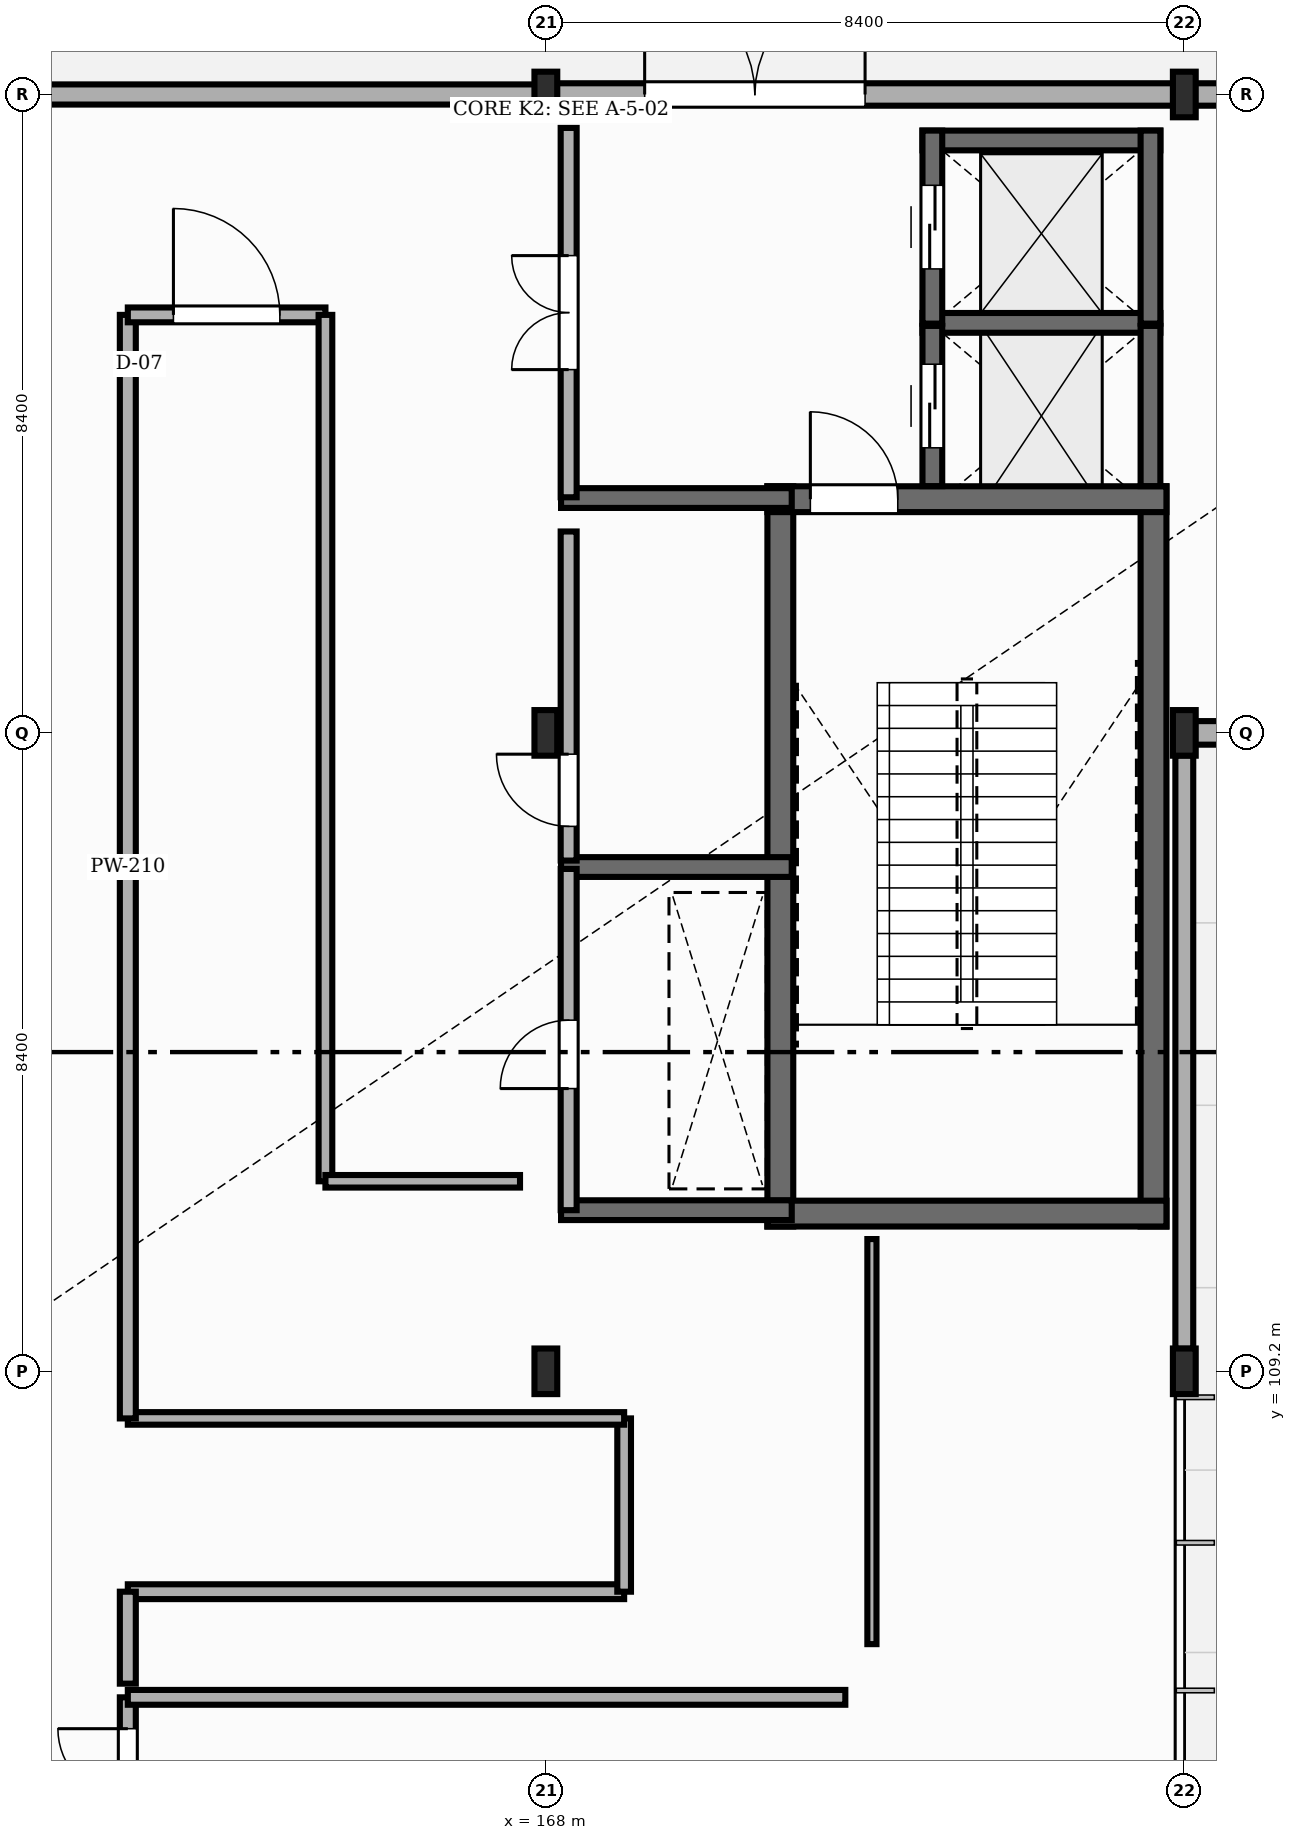
"""IFC4 building model, lengths in metres.
Left out: names, types, materials, properties, quantities, classifications, styles, units other than length and angle.
Written with IfcOpenShell. Run it as: python <this file> out.ifc"""

import sys

from ifc_helpers import new_model, si_unit, direction, frame, frame_2d, origin, origin_2d, place, context, subcontext, project, spatial, rectangle, i_section, extrude, element, fill, save


model = new_model("IFC4")
c1 = context("Model", 3, precision=1e-05, world=origin(), true_north=direction((0.0, 1.0)))
c2 = subcontext(c1, "Body", "Model", "MODEL_VIEW")
j1 = project(units=[si_unit("LENGTHUNIT", "METRE"), si_unit("PLANEANGLEUNIT", "RADIAN")], contexts=[c1])
p1 = place(None, origin())
s1 = spatial("IfcSite", under=j1, at=p1, CompositionType="ELEMENT")
p2 = place(p1, origin())
s2 = spatial("IfcBuilding", under=s1, at=p2, CompositionType="ELEMENT")
p3 = place(p2, origin())
s3 = spatial("IfcBuildingStorey", under=s2, at=p3, CompositionType="ELEMENT", Elevation=0.0)
for number, where, z_axis, x_axis in (
    (1, (168.0, 109.2, 0.0), (0.0, 0.0, 1.0), (1.0, 0.0, 0.0)),
    (2, (168.0, 117.6, 0.0), (0.0, 0.0, 1.0), (1.0, 0.0, 0.0)),
    (3, (168.0, 126.0, 0.0), (0.0, 0.0, 1.0), (1.0, 0.0, 0.0)),
    (4, (176.4, 109.2, 0.0), (0.0, 0.0, 1.0), (1.0, 0.0, 0.0)),
    (5, (176.4, 117.6, 0.0), (0.0, 0.0, 1.0), (1.0, 0.0, 0.0)),
    (6, (176.4, 126.0, 0.0), (0.0, 0.0, 1.0), (1.0, 0.0, 0.0)),
):
    element("IfcColumn", number, at=place(p3, frame(where, z_axis=z_axis, x_axis=x_axis)), inside=s3, PredefinedType="COLUMN", context=c2, shape_type="SweptSolid", body=[
        extrude(i_section(OverallWidth=0.3, OverallDepth=0.6, WebThickness=0.015, FlangeThickness=0.03, FilletRadius=0.027, at=origin_2d()), origin(), (0.0, 0.0, 1.0), 5.4),
    ])
p4 = place(p3, frame((176.4, 109.496, 0.0), z_axis=(0.0, 0.0, 1.0), x_axis=(0.0, 1.0, 0.0)))
e7 = element("IfcWall", 7, at=p4, inside=s3, PredefinedType="STANDARD", context=c2, shape_type="SweptSolid", body=[
    extrude(rectangle(XDim=7.808, YDim=0.235, at=frame_2d((3.904, 0.0))), origin(), (0.0, 0.0, 1.0), 4.797),
])
p5 = place(p3, frame((176.408, 117.6, 0.0), z_axis=(0.0, 0.0, 1.0), x_axis=(1.0, 0.0, 0.0)))
e8 = element("IfcWall", 8, at=p5, inside=s3, PredefinedType="STANDARD", context=c2, shape_type="SweptSolid", body=[
    extrude(rectangle(XDim=8.384, YDim=0.31, at=frame_2d((4.192, 0.0))), origin(), (0.0, 0.0, 1.0), 4.827),
])
p6 = place(p3, frame((184.792, 126.0, 0.0), z_axis=(0.0, 0.0, 1.0), x_axis=(-1.0, 0.0, 0.0)))
e9 = element("IfcWall", 9, at=p6, inside=s3, PredefinedType="STANDARD", context=c2, shape_type="SweptSolid", body=[
    extrude(rectangle(XDim=8.384, YDim=0.295, at=frame_2d((4.192, 0.0))), origin(), (0.0, 0.0, 1.0), 4.797),
])
p7 = place(p3, frame((168.008, 126.0, 0.0), z_axis=(0.0, 0.0, 1.0), x_axis=(1.0, 0.0, 0.0)))
e10 = element("IfcWall", 10, at=p7, inside=s3, PredefinedType="STANDARD", context=c2, shape_type="SweptSolid", body=[
    extrude(rectangle(XDim=8.384, YDim=0.295, at=frame_2d((4.192, 0.0))), origin(), (0.0, 0.0, 1.0), 4.827),
])
p8 = place(p7, frame((1.292, 0.0, 0.0)))
e11 = element("IfcOpeningElement", 11, at=p8, cuts=e10, PredefinedType="OPENING", context=c2, shape_type="SweptSolid", body=[
    extrude(rectangle(XDim=2.9, YDim=2.38, at=frame_2d((1.45, 1.19))), frame((0.0, 0.157, 0.0), z_axis=(0.0, -1.0, 0.0), x_axis=(1.0, 0.0, 0.0)), (0.0, 0.0, 1.0), 0.315),
])
p9 = place(p3, frame((167.992, 126.0, 0.0), z_axis=(0.0, 0.0, 1.0), x_axis=(-1.0, 0.0, 0.0)))
e12 = element("IfcWall", 12, at=p9, inside=s3, PredefinedType="STANDARD", context=c2, shape_type="SweptSolid", body=[
    extrude(rectangle(XDim=8.384, YDim=0.265, at=frame_2d((4.192, 0.0))), origin(), (0.0, 0.0, 1.0), 4.797),
])
for number, where, z_axis, x_axis in (
    (13, (171.085, 111.105, 0.0), (0.0, 0.0, 1.0), (0.0, 1.0, 0.0)),
    (14, (175.995, 111.105, 0.0), (0.0, 0.0, 1.0), (0.0, 1.0, 0.0)),
):
    element("IfcWall", number, at=place(p3, frame(where, z_axis=z_axis, x_axis=x_axis)), inside=s3, PredefinedType="SHEAR", context=c2, shape_type="SweptSolid", body=[
        extrude(rectangle(XDim=9.74, YDim=0.34, at=frame_2d((4.87, 0.0))), origin(), (0.0, 0.0, 1.0), 5.175),
    ])
p10 = place(p3, frame((170.915, 111.275, 0.0), z_axis=(0.0, 0.0, 1.0), x_axis=(1.0, 0.0, 0.0)))
e15 = element("IfcWall", 15, at=p10, inside=s3, PredefinedType="SHEAR", context=c2, shape_type="SweptSolid", body=[
    extrude(rectangle(XDim=5.25, YDim=0.34, at=frame_2d((2.625, 0.0))), origin(), (0.0, 0.0, 1.0), 5.175),
])
p11 = place(p3, frame((170.915, 120.675, 0.0), z_axis=(0.0, 0.0, 1.0), x_axis=(1.0, 0.0, 0.0)))
e16 = element("IfcWall", 16, at=p11, inside=s3, PredefinedType="SHEAR", context=c2, shape_type="SweptSolid", body=[
    extrude(rectangle(XDim=5.25, YDim=0.34, at=frame_2d((2.625, 0.0))), origin(), (0.0, 0.0, 1.0), 5.175),
])
p12 = place(p11, frame((0.565, 0.0, 0.0)))
e17 = element("IfcOpeningElement", 17, at=p12, cuts=e16, PredefinedType="OPENING", context=c2, shape_type="SweptSolid", body=[
    extrude(rectangle(XDim=1.15, YDim=2.15, at=frame_2d((0.575, 1.075))), frame((0.0, 0.18, 0.0), z_axis=(0.0, -1.0, 0.0), x_axis=(1.0, 0.0, 0.0)), (0.0, 0.0, 1.0), 0.36),
])
p13 = place(p3, frame((172.955, 122.995, 0.0), z_axis=(0.0, 0.0, 1.0), x_axis=(1.0, 0.0, 0.0)))
e18 = element("IfcWall", 18, at=p13, inside=s3, PredefinedType="SHEAR", context=c2, shape_type="SweptSolid", body=[
    extrude(rectangle(XDim=3.13, YDim=0.26, at=frame_2d((1.565, 0.0))), origin(), (0.0, 0.0, 1.0), 5.175),
])
p14 = place(p3, frame((175.955, 120.847, 0.0), z_axis=(0.0, 0.0, 1.0), x_axis=(0.0, 1.0, 0.0)))
e19 = element("IfcWall", 19, at=p14, inside=s3, PredefinedType="SHEAR", context=c2, shape_type="SweptSolid", body=[
    extrude(rectangle(XDim=2.108, YDim=0.26, at=frame_2d((1.054, 0.0))), origin(), (0.0, 0.0, 1.0), 5.175),
])
p15 = place(p3, frame((173.085, 120.847, 0.0), z_axis=(0.0, 0.0, 1.0), x_axis=(0.0, 1.0, 0.0)))
e20 = element("IfcWall", 20, at=p15, inside=s3, PredefinedType="SHEAR", context=c2, shape_type="SweptSolid", body=[
    extrude(rectangle(XDim=2.108, YDim=0.26, at=frame_2d((1.054, 0.0))), origin(), (0.0, 0.0, 1.0), 5.175),
])
p16 = place(p15, frame((0.504, 0.0, 0.0)))
e21 = element("IfcOpeningElement", 21, at=p16, cuts=e20, PredefinedType="OPENING", context=c2, shape_type="SweptSolid", body=[
    extrude(rectangle(XDim=1.1, YDim=2.15, at=frame_2d((0.55, 1.075))), frame((0.0, 0.14, 0.0), z_axis=(0.0, -1.0, 0.0), x_axis=(1.0, 0.0, 0.0)), (0.0, 0.0, 1.0), 0.28),
])
p17 = place(p3, frame((172.955, 125.395, 0.0), z_axis=(0.0, 0.0, 1.0), x_axis=(1.0, 0.0, 0.0)))
e22 = element("IfcWall", 22, at=p17, inside=s3, PredefinedType="SHEAR", context=c2, shape_type="SweptSolid", body=[
    extrude(rectangle(XDim=3.13, YDim=0.26, at=frame_2d((1.565, 0.0))), origin(), (0.0, 0.0, 1.0), 5.175),
])
p18 = place(p3, frame((175.955, 122.985, 0.0), z_axis=(0.0, 0.0, 1.0), x_axis=(0.0, 1.0, 0.0)))
e23 = element("IfcWall", 23, at=p18, inside=s3, PredefinedType="SHEAR", context=c2, shape_type="SweptSolid", body=[
    extrude(rectangle(XDim=2.54, YDim=0.26, at=frame_2d((1.27, 0.0))), origin(), (0.0, 0.0, 1.0), 5.175),
])
p19 = place(p3, frame((173.085, 122.985, 0.0), z_axis=(0.0, 0.0, 1.0), x_axis=(0.0, 1.0, 0.0)))
e24 = element("IfcWall", 24, at=p19, inside=s3, PredefinedType="SHEAR", context=c2, shape_type="SweptSolid", body=[
    extrude(rectangle(XDim=2.54, YDim=0.26, at=frame_2d((1.27, 0.0))), origin(), (0.0, 0.0, 1.0), 5.175),
])
p20 = place(p19, frame((0.72, 0.0, 0.0)))
e25 = element("IfcOpeningElement", 25, at=p20, cuts=e24, PredefinedType="OPENING", context=c2, shape_type="SweptSolid", body=[
    extrude(rectangle(XDim=1.1, YDim=2.15, at=frame_2d((0.55, 1.075))), frame((0.0, 0.14, 0.0), z_axis=(0.0, -1.0, 0.0), x_axis=(1.0, 0.0, 0.0)), (0.0, 0.0, 1.0), 0.28),
])
for number, where, z_axis, x_axis in (
    (26, (168.2, 111.32, 0.0), (0.0, 0.0, 1.0), (1.0, 0.0, 0.0)),
    (27, (168.2, 115.835, 0.0), (0.0, 0.0, 1.0), (1.0, 0.0, 0.0)),
    (28, (168.2, 120.69, 0.0), (0.0, 0.0, 1.0), (1.0, 0.0, 0.0)),
):
    element("IfcWall", number, at=place(p3, frame(where, z_axis=z_axis, x_axis=x_axis)), inside=s3, PredefinedType="SHEAR", context=c2, shape_type="SweptSolid", body=[
        extrude(rectangle(XDim=3.035, YDim=0.26, at=frame_2d((1.518, 0.0))), origin(), (0.0, 0.0, 1.0), 5.175),
    ])
p21 = place(p3, frame((168.3, 111.32, 0.0), z_axis=(0.0, 0.0, 1.0), x_axis=(0.0, 1.0, 0.0)))
e29 = element("IfcWall", 29, at=p21, inside=s3, PredefinedType="STANDARD", context=c2, shape_type="SweptSolid", body=[
    extrude(rectangle(XDim=4.49, YDim=0.21, at=frame_2d((2.245, 0.0))), origin(), (0.0, 0.0, 1.0), 4.557),
])
p22 = place(p21, frame((1.6, 0.0, 0.0)))
e30 = element("IfcOpeningElement", 30, at=p22, cuts=e29, PredefinedType="OPENING", context=c2, shape_type="SweptSolid", body=[
    extrude(rectangle(XDim=0.9, YDim=2.1, at=frame_2d((0.45, 1.05))), frame((0.0, 0.115, 0.0), z_axis=(0.0, -1.0, 0.0), x_axis=(1.0, 0.0, 0.0)), (0.0, 0.0, 1.0), 0.23),
])
p23 = place(p3, frame((168.3, 115.92, 0.0), z_axis=(0.0, 0.0, 1.0), x_axis=(0.0, 1.0, 0.0)))
e31 = element("IfcWall", 31, at=p23, inside=s3, PredefinedType="STANDARD", context=c2, shape_type="SweptSolid", body=[
    extrude(rectangle(XDim=4.33, YDim=0.21, at=frame_2d((2.165, 0.0))), origin(), (0.0, 0.0, 1.0), 4.557),
])
p24 = place(p23, frame((0.45, 0.0, 0.0)))
e32 = element("IfcOpeningElement", 32, at=p24, cuts=e31, PredefinedType="OPENING", context=c2, shape_type="SweptSolid", body=[
    extrude(rectangle(XDim=0.95, YDim=2.15, at=frame_2d((0.475, 1.075))), frame((0.0, 0.115, 0.0), z_axis=(0.0, -1.0, 0.0), x_axis=(1.0, 0.0, 0.0)), (0.0, 0.0, 1.0), 0.23),
])
p25 = place(p3, frame((168.3, 120.7, 0.0), z_axis=(0.0, 0.0, 1.0), x_axis=(0.0, 1.0, 0.0)))
e33 = element("IfcWall", 33, at=p25, inside=s3, PredefinedType="STANDARD", context=c2, shape_type="SweptSolid", body=[
    extrude(rectangle(XDim=4.86, YDim=0.21, at=frame_2d((2.43, 0.0))), origin(), (0.0, 0.0, 1.0), 4.667),
])
p26 = place(p25, frame((1.68, 0.0, 0.0)))
e34 = element("IfcOpeningElement", 34, at=p26, cuts=e33, PredefinedType="OPENING", context=c2, shape_type="SweptSolid", body=[
    extrude(rectangle(XDim=1.5, YDim=2.2, at=frame_2d((0.75, 1.1))), frame((0.0, 0.115, 0.0), z_axis=(0.0, -1.0, 0.0), x_axis=(1.0, 0.0, 0.0)), (0.0, 0.0, 1.0), 0.23),
])
p27 = place(p3, frame((162.5, 101.42, -0.004), z_axis=(0.0, 0.0, 1.0), x_axis=(0.0, 1.0, 0.0)))
e35 = element("IfcWall", 35, at=p27, inside=s3, PredefinedType="STANDARD", context=c2, shape_type="SweptSolid", body=[
    extrude(rectangle(XDim=3.49, YDim=0.21, at=frame_2d((1.745, 0.0))), origin(), (0.0, 0.0, 1.0), 4.891),
])
p28 = place(p27, frame((2.157, 0.0, 0.0)))
e36 = element("IfcOpeningElement", 36, at=p28, cuts=e35, PredefinedType="OPENING", context=c2, shape_type="SweptSolid", body=[
    extrude(rectangle(XDim=0.92, YDim=2.3, at=frame_2d((0.46, 1.15))), frame((0.0, 0.115, 0.0), z_axis=(0.0, -1.0, 0.0), x_axis=(1.0, 0.0, 0.0)), (0.0, 0.0, 1.0), 0.23),
])
p29 = place(p3, frame((162.5, 104.91, -0.004), z_axis=(0.0, 0.0, 1.0), x_axis=(1.0, 0.0, 0.0)))
e37 = element("IfcWall", 37, at=p29, inside=s3, PredefinedType="STANDARD", context=c2, shape_type="SweptSolid", body=[
    extrude(rectangle(XDim=9.44, YDim=0.195, at=frame_2d((4.72, 0.0))), origin(), (0.0, 0.0, 1.0), 5.179),
])
p30 = place(p3, frame((172.29, 105.61, -0.004), z_axis=(0.0, 0.0, 1.0), x_axis=(0.0, 1.0, 0.0)))
e38 = element("IfcWall", 38, at=p30, inside=s3, PredefinedType="STANDARD", context=c2, shape_type="SweptSolid", body=[
    extrude(rectangle(XDim=5.33, YDim=0.12, at=frame_2d((2.665, 0.0))), origin(), (0.0, 0.0, 1.0), 5.179),
])
p31 = place(p3, frame((162.5, 106.3, -0.004), z_axis=(0.0, 0.0, 1.0), x_axis=(1.0, 0.0, 0.0)))
e39 = element("IfcWall", 39, at=p31, inside=s3, PredefinedType="STANDARD", context=c2, shape_type="SweptSolid", body=[
    extrude(rectangle(XDim=6.53, YDim=0.195, at=frame_2d((3.265, 0.0))), origin(), (0.0, 0.0, 1.0), 5.179),
])
p32 = place(p3, frame((169.03, 106.3, -0.004), z_axis=(0.0, 0.0, 1.0), x_axis=(0.0, 1.0, 0.0)))
e40 = element("IfcWall", 40, at=p32, inside=s3, PredefinedType="STANDARD", context=c2, shape_type="SweptSolid", body=[
    extrude(rectangle(XDim=2.28, YDim=0.18, at=frame_2d((1.14, 0.0))), origin(), (0.0, 0.0, 1.0), 5.179),
])
p33 = place(p3, frame((169.03, 108.58, -0.004), z_axis=(0.0, 0.0, 1.0), x_axis=(-1.0, 0.0, 0.0)))
e41 = element("IfcWall", 41, at=p33, inside=s3, PredefinedType="STANDARD", context=c2, shape_type="SweptSolid", body=[
    extrude(rectangle(XDim=6.53, YDim=0.165, at=frame_2d((3.265, 0.0))), origin(), (0.0, 0.0, 1.0), 5.179),
])
p34 = place(p3, frame((162.5, 108.58, -0.004), z_axis=(0.0, 0.0, 1.0), x_axis=(0.0, 1.0, 0.0)))
e42 = element("IfcWall", 42, at=p34, inside=s3, PredefinedType="STANDARD", context=c2, shape_type="SweptSolid", body=[
    extrude(rectangle(XDim=14.52, YDim=0.21, at=frame_2d((7.26, 0.0))), origin(), (0.0, 0.0, 1.0), 4.891),
])
p35 = place(p3, frame((162.5, 123.1, -0.004), z_axis=(0.0, 0.0, 1.0), x_axis=(1.0, 0.0, 0.0)))
e43 = element("IfcWall", 43, at=p35, inside=s3, PredefinedType="STANDARD", context=c2, shape_type="SweptSolid", body=[
    extrude(rectangle(XDim=2.6, YDim=0.195, at=frame_2d((1.3, 0.0))), origin(), (0.0, 0.0, 1.0), 5.179),
])
p36 = place(p35, frame((0.6, 0.0, 0.0)))
e44 = element("IfcOpeningElement", 44, at=p36, cuts=e43, PredefinedType="OPENING", context=c2, shape_type="SweptSolid", body=[
    extrude(rectangle(XDim=1.4, YDim=2.06, at=frame_2d((0.7, 1.03))), frame((0.0, 0.107, 0.0), z_axis=(0.0, -1.0, 0.0), x_axis=(1.0, 0.0, 0.0)), (0.0, 0.0, 1.0), 0.215),
])
p37 = place(p3, frame((165.1, 123.1, -0.004), z_axis=(0.0, 0.0, 1.0), x_axis=(0.0, -1.0, 0.0)))
e45 = element("IfcWall", 45, at=p37, inside=s3, PredefinedType="STANDARD", context=c2, shape_type="SweptSolid", body=[
    extrude(rectangle(XDim=11.4, YDim=0.18, at=frame_2d((5.7, 0.0))), origin(), (0.0, 0.0, 1.0), 4.921),
])
p38 = place(p3, frame((165.1, 111.7, -0.004), z_axis=(0.0, 0.0, 1.0), x_axis=(1.0, 0.0, 0.0)))
e46 = element("IfcWall", 46, at=p38, inside=s3, PredefinedType="STANDARD", context=c2, shape_type="SweptSolid", body=[
    extrude(rectangle(XDim=2.56, YDim=0.165, at=frame_2d((1.28, 0.0))), origin(), (0.0, 0.0, 1.0), 5.179),
])
p39 = place(p3, frame((162.5, 105.09, -0.004), z_axis=(0.0, 0.0, 1.0), x_axis=(0.0, 1.0, 0.0)))
e47 = element("IfcWall", 47, at=p39, inside=s3, PredefinedType="STANDARD", context=c2, shape_type="SweptSolid", body=[
    extrude(rectangle(XDim=1.21, YDim=0.21, at=frame_2d((0.605, 0.0))), origin(), (0.0, 0.0, 1.0), 4.891),
])
p40 = place(p8, origin())
e48 = element("IfcDoor", 48, at=p40, inside=s3, OperationType="DOUBLE_DOOR_SINGLE_SWING", PredefinedType="DOOR", context=c2, shape_type="SweptSolid", body=[
    extrude(rectangle(XDim=2.9, YDim=2.38, at=frame_2d((1.45, 1.19))), frame((0.0, 0.025, 0.0), z_axis=(0.0, -1.0, 0.0), x_axis=(1.0, 0.0, 0.0)), (0.0, 0.0, 1.0), 0.05),
])
fill(e11, e48)
p41 = place(p12, origin())
e49 = element("IfcDoor", 49, at=p41, inside=s3, OperationType="SINGLE_SWING_LEFT", PredefinedType="DOOR", context=c2, shape_type="SweptSolid", body=[
    extrude(rectangle(XDim=1.15, YDim=2.15, at=frame_2d((0.575, 1.075))), frame((0.0, 0.025, 0.0), z_axis=(0.0, -1.0, 0.0), x_axis=(1.0, 0.0, 0.0)), (0.0, 0.0, 1.0), 0.05),
])
fill(e17, e49)
p42 = place(p16, origin())
e50 = element("IfcDoor", 50, at=p42, inside=s3, OperationType="DOUBLE_DOOR_SLIDING", PredefinedType="DOOR", context=c2, shape_type="SweptSolid", body=[
    extrude(rectangle(XDim=1.1, YDim=2.15, at=frame_2d((0.55, 1.075))), frame((0.0, 0.025, 0.0), z_axis=(0.0, -1.0, 0.0), x_axis=(1.0, 0.0, 0.0)), (0.0, 0.0, 1.0), 0.05),
])
fill(e21, e50)
p43 = place(p20, origin())
e51 = element("IfcDoor", 51, at=p43, inside=s3, OperationType="DOUBLE_DOOR_SLIDING", PredefinedType="DOOR", context=c2, shape_type="SweptSolid", body=[
    extrude(rectangle(XDim=1.1, YDim=2.15, at=frame_2d((0.55, 1.075))), frame((0.0, 0.025, 0.0), z_axis=(0.0, -1.0, 0.0), x_axis=(1.0, 0.0, 0.0)), (0.0, 0.0, 1.0), 0.05),
])
fill(e25, e51)
p44 = place(p22, origin())
e52 = element("IfcDoor", 52, at=p44, inside=s3, OperationType="SINGLE_SWING_LEFT", PredefinedType="DOOR", context=c2, shape_type="SweptSolid", body=[
    extrude(rectangle(XDim=0.9, YDim=2.1, at=frame_2d((0.45, 1.05))), frame((0.0, 0.025, 0.0), z_axis=(0.0, -1.0, 0.0), x_axis=(1.0, 0.0, 0.0)), (0.0, 0.0, 1.0), 0.05),
])
fill(e30, e52)
p45 = place(p24, origin())
e53 = element("IfcDoor", 53, at=p45, inside=s3, OperationType="SINGLE_SWING_RIGHT", PredefinedType="DOOR", context=c2, shape_type="SweptSolid", body=[
    extrude(rectangle(XDim=0.95, YDim=2.15, at=frame_2d((0.475, 1.075))), frame((0.0, 0.025, 0.0), z_axis=(0.0, -1.0, 0.0), x_axis=(1.0, 0.0, 0.0)), (0.0, 0.0, 1.0), 0.05),
])
fill(e32, e53)
p46 = place(p26, origin())
e54 = element("IfcDoor", 54, at=p46, inside=s3, OperationType="DOUBLE_DOOR_SINGLE_SWING", PredefinedType="DOOR", context=c2, shape_type="SweptSolid", body=[
    extrude(rectangle(XDim=1.5, YDim=2.2, at=frame_2d((0.75, 1.1))), frame((0.0, 0.025, 0.0), z_axis=(0.0, -1.0, 0.0), x_axis=(1.0, 0.0, 0.0)), (0.0, 0.0, 1.0), 0.05),
])
fill(e34, e54)
p47 = place(p28, origin())
e55 = element("IfcDoor", 55, at=p47, inside=s3, OperationType="SINGLE_SWING_RIGHT", PredefinedType="DOOR", context=c2, shape_type="SweptSolid", body=[
    extrude(rectangle(XDim=0.92, YDim=2.3, at=frame_2d((0.46, 1.15))), frame((0.0, 0.025, 0.0), z_axis=(0.0, -1.0, 0.0), x_axis=(1.0, 0.0, 0.0)), (0.0, 0.0, 1.0), 0.05),
])
fill(e36, e55)
p48 = place(p36, origin())
e56 = element("IfcDoor", 56, at=p48, inside=s3, OperationType="SINGLE_SWING_LEFT", PredefinedType="DOOR", context=c2, shape_type="SweptSolid", body=[
    extrude(rectangle(XDim=1.4, YDim=2.06, at=frame_2d((0.7, 1.03))), frame((0.0, 0.025, 0.0), z_axis=(0.0, -1.0, 0.0), x_axis=(1.0, 0.0, 0.0)), (0.0, 0.0, 1.0), 0.05),
])
fill(e44, e56)
save(model, sys.argv[1])
